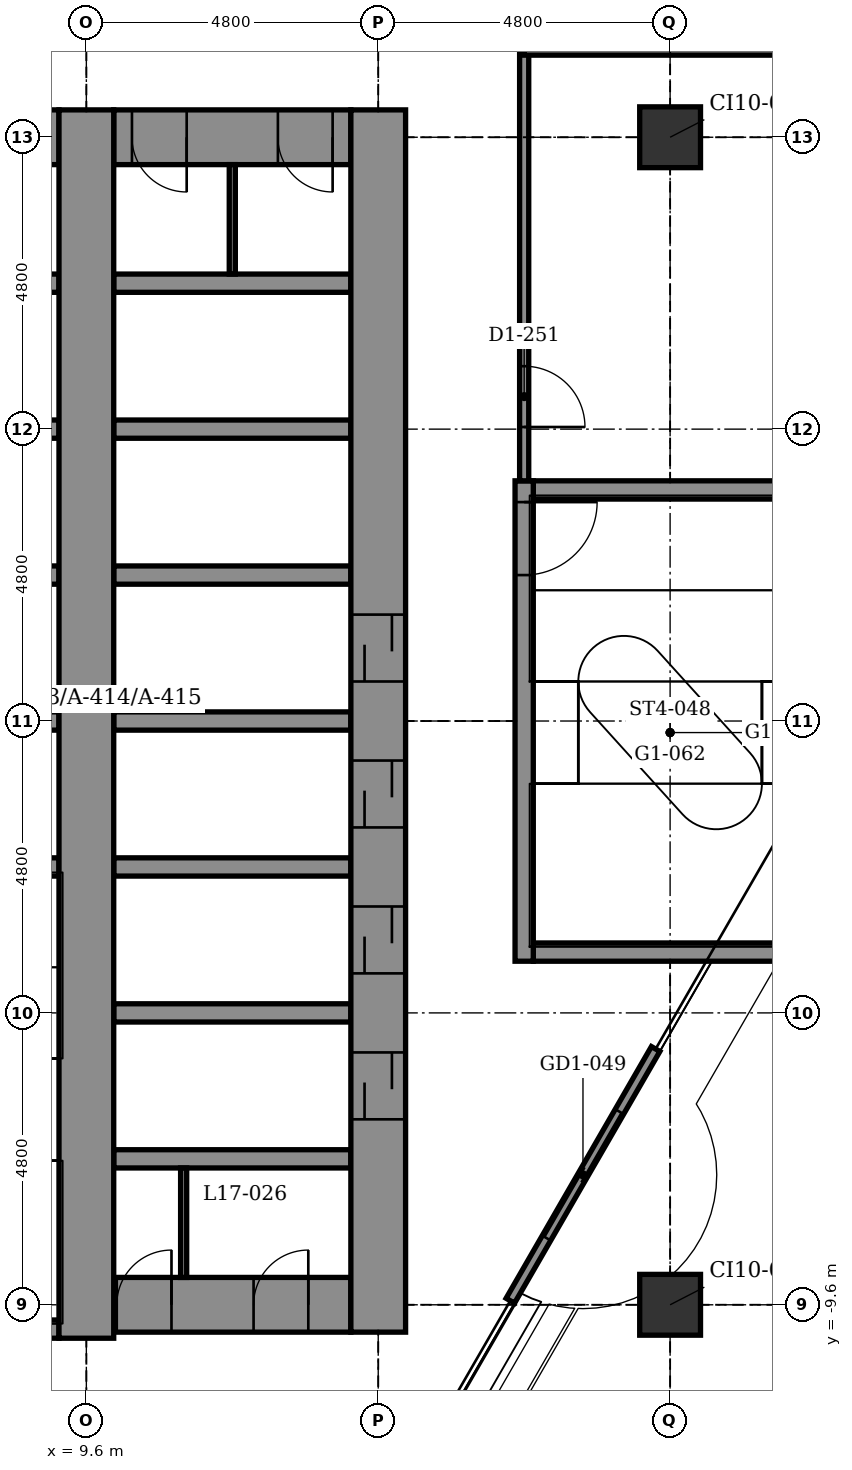
"""IFC4 building model, lengths in metres.
Left out: names, types, materials, properties, quantities, classifications, styles, units other than length and angle.
Written with IfcOpenShell. Run it as: python <this file> out.ifc"""

import sys

from ifc_helpers import new_model, si_unit, direction, frame, frame_2d, origin, origin_2d, place, context, subcontext, project, spatial, rectangle, extrude, element, fill, save


model = new_model("IFC4")
c1 = context("Model", 3, precision=1e-05, world=origin(), true_north=direction((0.0, 1.0)))
c2 = subcontext(c1, "Body", "Model", "MODEL_VIEW")
j1 = project(units=[si_unit("LENGTHUNIT", "METRE"), si_unit("PLANEANGLEUNIT", "RADIAN")], contexts=[c1])
p1 = place(None, origin())
s1 = spatial("IfcSite", under=j1, at=p1, CompositionType="ELEMENT")
p2 = place(p1, origin())
s2 = spatial("IfcBuilding", under=s1, at=p2, CompositionType="ELEMENT")
p3 = place(p2, frame((0.0, 0.0, 91.4)))
s3 = spatial("IfcBuildingStorey", under=s2, at=p3, CompositionType="ELEMENT", Elevation=91.4)
for number, where, z_axis, x_axis in (
    (1, (19.2, -9.6, -0.2), (0.0, 0.0, 1.0), (1.0, 0.0, 0.0)),
    (2, (19.2, 9.6, -0.2), (0.0, 0.0, 1.0), (1.0, 0.0, 0.0)),
):
    element("IfcColumn", number, at=place(p3, frame(where, z_axis=z_axis, x_axis=x_axis)), inside=s3, PredefinedType="COLUMN", context=c2, shape_type="SweptSolid", body=[
        extrude(rectangle(XDim=1.0, YDim=1.0, at=origin_2d()), origin(), (0.0, 0.0, 1.0), 4.5),
    ])
p4 = place(p3, frame((4.95, -10.0, -0.2), z_axis=(0.0, 0.0, 1.0), x_axis=(1.0, 0.0, 0.0)))
e3 = element("IfcWall", 3, at=p4, inside=s3, PredefinedType="STANDARD", context=c2, shape_type="SweptSolid", body=[
    extrude(rectangle(XDim=4.2, YDim=0.3, at=frame_2d((2.1, 0.0))), origin(), (0.0, 0.0, 1.0), 4.5),
])
p5 = place(p3, frame((10.05, -9.6, -0.2), z_axis=(0.0, 0.0, 1.0), x_axis=(1.0, 0.0, 0.0)))
e4 = element("IfcWall", 4, at=p5, inside=s3, PredefinedType="SHEAR", context=c2, shape_type="SweptSolid", body=[
    extrude(rectangle(XDim=3.9, YDim=0.9, at=frame_2d((1.95, 0.0))), origin(), (0.0, 0.0, 1.0), 4.5),
])
p6 = place(p5, frame((0.05, 0.0, 0.2)))
e5 = element("IfcOpeningElement", 5, at=p6, cuts=e4, PredefinedType="OPENING", context=c2, shape_type="SweptSolid", body=[
    extrude(rectangle(XDim=0.9, YDim=2.1, at=frame_2d((0.45, 1.05))), frame((0.0, 0.46, 0.0), z_axis=(0.0, -1.0, 0.0), x_axis=(1.0, 0.0, 0.0)), (0.0, 0.0, 1.0), 0.92),
])
p7 = place(p5, frame((2.3, 0.0, 0.2)))
e6 = element("IfcOpeningElement", 6, at=p7, cuts=e4, PredefinedType="OPENING", context=c2, shape_type="SweptSolid", body=[
    extrude(rectangle(XDim=0.9, YDim=2.1, at=frame_2d((0.45, 1.05))), frame((0.0, 0.46, 0.0), z_axis=(0.0, -1.0, 0.0), x_axis=(1.0, 0.0, 0.0)), (0.0, 0.0, 1.0), 0.92),
])
for number, where, z_axis, x_axis in (
    (7, (10.05, -7.2, -0.2), (0.0, 0.0, 1.0), (1.0, 0.0, 0.0)),
    (8, (10.05, -4.8, -0.2), (0.0, 0.0, 1.0), (1.0, 0.0, 0.0)),
):
    element("IfcWall", number, at=place(p3, frame(where, z_axis=z_axis, x_axis=x_axis)), inside=s3, PredefinedType="STANDARD", context=c2, shape_type="SweptSolid", body=[
        extrude(rectangle(XDim=3.9, YDim=0.3, at=frame_2d((1.95, 0.0))), origin(), (0.0, 0.0, 1.0), 4.5),
    ])
p8 = place(p3, frame((16.95, -3.8, -0.2), z_axis=(0.0, 0.0, 1.0), x_axis=(1.0, 0.0, 0.0)))
e9 = element("IfcWall", 9, at=p8, inside=s3, PredefinedType="STANDARD", context=c2, shape_type="SweptSolid", body=[
    extrude(rectangle(XDim=4.5, YDim=0.3, at=frame_2d((2.25, 0.0))), origin(), (0.0, 0.0, 1.0), 4.5),
])
p9 = place(p3, frame((6.15, -2.4, -0.2), z_axis=(0.0, 0.0, 1.0), x_axis=(1.0, 0.0, 0.0)))
e10 = element("IfcWall", 10, at=p9, inside=s3, PredefinedType="STANDARD", context=c2, shape_type="SweptSolid", body=[
    extrude(rectangle(XDim=3.0, YDim=0.3, at=frame_2d((1.5, 0.0))), origin(), (0.0, 0.0, 1.0), 4.5),
])
p10 = place(p3, frame((10.05, -2.4, -0.2), z_axis=(0.0, 0.0, 1.0), x_axis=(1.0, 0.0, 0.0)))
e11 = element("IfcWall", 11, at=p10, inside=s3, PredefinedType="STANDARD", context=c2, shape_type="SweptSolid", body=[
    extrude(rectangle(XDim=3.9, YDim=0.3, at=frame_2d((1.95, 0.0))), origin(), (0.0, 0.0, 1.0), 4.5),
])
p11 = place(p3, frame((6.15, 0.0, -0.2), z_axis=(0.0, 0.0, 1.0), x_axis=(1.0, 0.0, 0.0)))
e12 = element("IfcWall", 12, at=p11, inside=s3, PredefinedType="STANDARD", context=c2, shape_type="SweptSolid", body=[
    extrude(rectangle(XDim=3.0, YDim=0.3, at=frame_2d((1.5, 0.0))), origin(), (0.0, 0.0, 1.0), 4.5),
])
p12 = place(p3, frame((10.05, 0.0, -0.2), z_axis=(0.0, 0.0, 1.0), x_axis=(1.0, 0.0, 0.0)))
e13 = element("IfcWall", 13, at=p12, inside=s3, PredefinedType="STANDARD", context=c2, shape_type="SweptSolid", body=[
    extrude(rectangle(XDim=3.9, YDim=0.3, at=frame_2d((1.95, 0.0))), origin(), (0.0, 0.0, 1.0), 4.5),
])
p13 = place(p3, frame((6.15, 2.4, -0.2), z_axis=(0.0, 0.0, 1.0), x_axis=(1.0, 0.0, 0.0)))
e14 = element("IfcWall", 14, at=p13, inside=s3, PredefinedType="STANDARD", context=c2, shape_type="SweptSolid", body=[
    extrude(rectangle(XDim=3.0, YDim=0.3, at=frame_2d((1.5, 0.0))), origin(), (0.0, 0.0, 1.0), 4.5),
])
p14 = place(p3, frame((10.05, 2.4, -0.2), z_axis=(0.0, 0.0, 1.0), x_axis=(1.0, 0.0, 0.0)))
e15 = element("IfcWall", 15, at=p14, inside=s3, PredefinedType="STANDARD", context=c2, shape_type="SweptSolid", body=[
    extrude(rectangle(XDim=3.9, YDim=0.3, at=frame_2d((1.95, 0.0))), origin(), (0.0, 0.0, 1.0), 4.5),
])
p15 = place(p3, frame((16.95, 3.8, -0.2), z_axis=(0.0, 0.0, 1.0), x_axis=(1.0, 0.0, 0.0)))
e16 = element("IfcWall", 16, at=p15, inside=s3, PredefinedType="STANDARD", context=c2, shape_type="SweptSolid", body=[
    extrude(rectangle(XDim=4.5, YDim=0.3, at=frame_2d((2.25, 0.0))), origin(), (0.0, 0.0, 1.0), 4.5),
])
p16 = place(p3, frame((6.15, 4.8, -0.2), z_axis=(0.0, 0.0, 1.0), x_axis=(1.0, 0.0, 0.0)))
e17 = element("IfcWall", 17, at=p16, inside=s3, PredefinedType="STANDARD", context=c2, shape_type="SweptSolid", body=[
    extrude(rectangle(XDim=3.0, YDim=0.3, at=frame_2d((1.5, 0.0))), origin(), (0.0, 0.0, 1.0), 4.5),
])
p17 = place(p3, frame((10.05, 4.8, -0.2), z_axis=(0.0, 0.0, 1.0), x_axis=(1.0, 0.0, 0.0)))
e18 = element("IfcWall", 18, at=p17, inside=s3, PredefinedType="STANDARD", context=c2, shape_type="SweptSolid", body=[
    extrude(rectangle(XDim=3.9, YDim=0.3, at=frame_2d((1.95, 0.0))), origin(), (0.0, 0.0, 1.0), 4.5),
])
p18 = place(p3, frame((6.0, 7.2, -0.2), z_axis=(0.0, 0.0, 1.0), x_axis=(1.0, 0.0, 0.0)))
e19 = element("IfcWall", 19, at=p18, inside=s3, PredefinedType="STANDARD", context=c2, shape_type="SweptSolid", body=[
    extrude(rectangle(XDim=3.15, YDim=0.3, at=frame_2d((1.575, 0.0))), origin(), (0.0, 0.0, 1.0), 4.5),
])
p19 = place(p3, frame((10.05, 7.2, -0.2), z_axis=(0.0, 0.0, 1.0), x_axis=(1.0, 0.0, 0.0)))
e20 = element("IfcWall", 20, at=p19, inside=s3, PredefinedType="STANDARD", context=c2, shape_type="SweptSolid", body=[
    extrude(rectangle(XDim=3.9, YDim=0.3, at=frame_2d((1.95, 0.0))), origin(), (0.0, 0.0, 1.0), 4.5),
])
p20 = place(p3, frame((-5.25, 9.6, -0.2), z_axis=(0.0, 0.0, 1.0), x_axis=(1.0, 0.0, 0.0)))
e21 = element("IfcWall", 21, at=p20, inside=s3, PredefinedType="SHEAR", context=c2, shape_type="SweptSolid", body=[
    extrude(rectangle(XDim=14.4, YDim=0.9, at=frame_2d((7.2, 0.0))), origin(), (0.0, 0.0, 1.0), 4.5),
])
p21 = place(p20, frame((9.35, 0.0, 0.2)))
e22 = element("IfcOpeningElement", 22, at=p21, cuts=e21, PredefinedType="OPENING", context=c2, shape_type="SweptSolid", body=[
    extrude(rectangle(XDim=1.4, YDim=2.1, at=frame_2d((0.7, 1.05))), frame((0.0, 0.46, 0.0), z_axis=(0.0, -1.0, 0.0), x_axis=(1.0, 0.0, 0.0)), (0.0, 0.0, 1.0), 0.92),
])
p22 = place(p3, frame((10.05, 9.6, -0.2), z_axis=(0.0, 0.0, 1.0), x_axis=(1.0, 0.0, 0.0)))
e23 = element("IfcWall", 23, at=p22, inside=s3, PredefinedType="SHEAR", context=c2, shape_type="SweptSolid", body=[
    extrude(rectangle(XDim=3.9, YDim=0.9, at=frame_2d((1.95, 0.0))), origin(), (0.0, 0.0, 1.0), 4.5),
])
p23 = place(p22, frame((0.3, 0.0, 0.2)))
e24 = element("IfcOpeningElement", 24, at=p23, cuts=e23, PredefinedType="OPENING", context=c2, shape_type="SweptSolid", body=[
    extrude(rectangle(XDim=0.9, YDim=2.1, at=frame_2d((0.45, 1.05))), frame((0.0, 0.46, 0.0), z_axis=(0.0, -1.0, 0.0), x_axis=(1.0, 0.0, 0.0)), (0.0, 0.0, 1.0), 0.92),
])
p24 = place(p22, frame((2.7, 0.0, 0.2)))
e25 = element("IfcOpeningElement", 25, at=p24, cuts=e23, PredefinedType="OPENING", context=c2, shape_type="SweptSolid", body=[
    extrude(rectangle(XDim=0.9, YDim=2.1, at=frame_2d((0.45, 1.05))), frame((0.0, 0.46, 0.0), z_axis=(0.0, -1.0, 0.0), x_axis=(1.0, 0.0, 0.0)), (0.0, 0.0, 1.0), 0.92),
])
p25 = place(p3, frame((9.6, -10.15, -0.2), z_axis=(0.0, 0.0, 1.0), x_axis=(0.0, 1.0, 0.0)))
e26 = element("IfcWall", 26, at=p25, inside=s3, PredefinedType="SHEAR", context=c2, shape_type="SweptSolid", body=[
    extrude(rectangle(XDim=20.2, YDim=0.9, at=frame_2d((10.1, 0.0))), origin(), (0.0, 0.0, 1.0), 4.5),
])
p26 = place(p3, frame((14.4, -10.05, -0.2), z_axis=(0.0, 0.0, 1.0), x_axis=(0.0, 1.0, 0.0)))
e27 = element("IfcWall", 27, at=p26, inside=s3, PredefinedType="SHEAR", context=c2, shape_type="SweptSolid", body=[
    extrude(rectangle(XDim=20.1, YDim=0.9, at=frame_2d((10.05, 0.0))), origin(), (0.0, 0.0, 1.0), 4.5),
])
p27 = place(p26, frame((3.5, 0.0, 0.2)))
e28 = element("IfcOpeningElement", 28, at=p27, cuts=e27, PredefinedType="OPENING", context=c2, shape_type="SweptSolid", body=[
    extrude(rectangle(XDim=1.1, YDim=2.1, at=frame_2d((0.55, 1.05))), frame((0.0, 0.46, 0.0), z_axis=(0.0, -1.0, 0.0), x_axis=(1.0, 0.0, 0.0)), (0.0, 0.0, 1.0), 0.92),
])
p28 = place(p26, frame((5.9, 0.0, 0.2)))
e29 = element("IfcOpeningElement", 29, at=p28, cuts=e27, PredefinedType="OPENING", context=c2, shape_type="SweptSolid", body=[
    extrude(rectangle(XDim=1.1, YDim=2.1, at=frame_2d((0.55, 1.05))), frame((0.0, 0.46, 0.0), z_axis=(0.0, -1.0, 0.0), x_axis=(1.0, 0.0, 0.0)), (0.0, 0.0, 1.0), 0.92),
])
p29 = place(p26, frame((8.3, 0.0, 0.2)))
e30 = element("IfcOpeningElement", 30, at=p29, cuts=e27, PredefinedType="OPENING", context=c2, shape_type="SweptSolid", body=[
    extrude(rectangle(XDim=1.1, YDim=2.1, at=frame_2d((0.55, 1.05))), frame((0.0, 0.46, 0.0), z_axis=(0.0, -1.0, 0.0), x_axis=(1.0, 0.0, 0.0)), (0.0, 0.0, 1.0), 0.92),
])
p30 = place(p26, frame((10.7, 0.0, 0.2)))
e31 = element("IfcOpeningElement", 31, at=p30, cuts=e27, PredefinedType="OPENING", context=c2, shape_type="SweptSolid", body=[
    extrude(rectangle(XDim=1.1, YDim=2.1, at=frame_2d((0.55, 1.05))), frame((0.0, 0.46, 0.0), z_axis=(0.0, -1.0, 0.0), x_axis=(1.0, 0.0, 0.0)), (0.0, 0.0, 1.0), 0.92),
])
p31 = place(p3, frame((16.8, -3.95, -0.2), z_axis=(0.0, 0.0, 1.0), x_axis=(0.0, 1.0, 0.0)))
e32 = element("IfcWall", 32, at=p31, inside=s3, PredefinedType="STANDARD", context=c2, shape_type="SweptSolid", body=[
    extrude(rectangle(XDim=7.9, YDim=0.3, at=frame_2d((3.95, 0.0))), origin(), (0.0, 0.0, 1.0), 4.5),
])
p32 = place(p31, frame((6.35, 0.0, 0.2)))
e33 = element("IfcOpeningElement", 33, at=p32, cuts=e32, PredefinedType="OPENING", context=c2, shape_type="SweptSolid", body=[
    extrude(rectangle(XDim=1.2, YDim=2.1, at=frame_2d((0.6, 1.05))), frame((0.0, 0.16, 0.0), z_axis=(0.0, -1.0, 0.0), x_axis=(1.0, 0.0, 0.0)), (0.0, 0.0, 1.0), 0.32),
])
p33 = place(p3, frame((18.962, -5.394, 0.0), z_axis=(0.0, 0.0, 1.0), x_axis=(-0.500017192868, -0.86601547725, 0.0)))
e34 = element("IfcWall", 34, at=p33, inside=s3, PredefinedType="PARTITIONING", context=c2, shape_type="SweptSolid", body=[
    extrude(rectangle(XDim=4.78, YDim=0.16, at=frame_2d((2.39, 0.0))), origin(), (0.0, 0.0, 1.0), 4.3),
])
p34 = place(p33, frame((1.19, 0.0, 0.0)))
e35 = element("IfcOpeningElement", 35, at=p34, cuts=e34, PredefinedType="OPENING", context=c2, shape_type="SweptSolid", body=[
    extrude(rectangle(XDim=2.4, YDim=2.4, at=frame_2d((1.2, 1.2))), frame((0.0, 0.09, 0.0), z_axis=(0.0, -1.0, 0.0), x_axis=(1.0, 0.0, 0.0)), (0.0, 0.0, 1.0), 0.18),
])
p35 = place(p3, frame((16.8, 3.95, 0.0), z_axis=(0.0, 0.0, 1.0), x_axis=(0.0, 1.0, 0.0)))
e36 = element("IfcWall", 36, at=p35, inside=s3, PredefinedType="PARTITIONING", context=c2, shape_type="SweptSolid", body=[
    extrude(rectangle(XDim=8.75, YDim=0.15, at=frame_2d((4.375, 0.0))), origin(), (0.0, 0.0, 1.0), 4.3),
])
p36 = place(p35, frame((7.425, 0.0, 0.0)))
e37 = element("IfcOpeningElement", 37, at=p36, cuts=e36, PredefinedType="OPENING", context=c2, shape_type="SweptSolid", body=[
    extrude(rectangle(XDim=1.0, YDim=2.1, at=frame_2d((0.5, 1.05))), frame((0.0, 0.085, 0.0), z_axis=(0.0, -1.0, 0.0), x_axis=(1.0, 0.0, 0.0)), (0.0, 0.0, 1.0), 0.17),
])
p37 = place(p35, frame((0.885, 0.0, 0.0)))
e38 = element("IfcOpeningElement", 38, at=p37, cuts=e36, PredefinedType="OPENING", context=c2, shape_type="SweptSolid", body=[
    extrude(rectangle(XDim=1.0, YDim=2.1, at=frame_2d((0.5, 1.05))), frame((0.0, 0.085, 0.0), z_axis=(0.0, -1.0, 0.0), x_axis=(1.0, 0.0, 0.0)), (0.0, 0.0, 1.0), 0.17),
])
for number, where, z_axis, x_axis in (
    (39, (12.0, 7.35, 0.0), (0.0, 0.0, 1.0), (0.0, 1.0, 0.0)),
    (40, (11.2, -9.15, 0.0), (0.0, 0.0, 1.0), (0.0, 1.0, 0.0)),
):
    element("IfcWall", number, at=place(p3, frame(where, z_axis=z_axis, x_axis=x_axis)), inside=s3, PredefinedType="PARTITIONING", context=c2, shape_type="SweptSolid", body=[
        extrude(rectangle(XDim=1.8, YDim=0.1, at=frame_2d((0.9, 0.0))), origin(), (0.0, 0.0, 1.0), 4.3),
    ])
p38 = place(p3, frame((16.8, 11.0, 0.0), z_axis=(0.0, 0.0, 1.0), x_axis=(1.0, 0.0, 0.0)))
e41 = element("IfcWall", 41, at=p38, inside=s3, PredefinedType="PARTITIONING", context=c2, shape_type="SweptSolid", body=[
    extrude(rectangle(XDim=8.578, YDim=0.1, at=frame_2d((4.289, 0.0))), origin(), (0.0, 0.0, 1.0), 4.3),
])
p39 = place(p34, origin())
e42 = element("IfcDoor", 42, at=p39, inside=s3, OperationType="DOUBLE_DOOR_SLIDING", PredefinedType="DOOR", context=c2, shape_type="SweptSolid", body=[
    extrude(rectangle(XDim=2.4, YDim=2.4, at=frame_2d((1.2, 1.2))), frame((0.0, 0.025, 0.0), z_axis=(0.0, -1.0, 0.0), x_axis=(1.0, 0.0, 0.0)), (0.0, 0.0, 1.0), 0.05),
])
fill(e35, e42)
p40 = place(p37, frame((1.0, 0.0, 0.0), z_axis=(0.0, 0.0, 1.0), x_axis=(-1.0, 0.0, 0.0)))
e43 = element("IfcDoor", 43, at=p40, inside=s3, OperationType="SINGLE_SWING_LEFT", PredefinedType="DOOR", context=c2, shape_type="SweptSolid", body=[
    extrude(rectangle(XDim=1.0, YDim=2.1, at=frame_2d((0.5, 1.05))), frame((0.0, 0.025, 0.0), z_axis=(0.0, -1.0, 0.0), x_axis=(1.0, 0.0, 0.0)), (0.0, 0.0, 1.0), 0.05),
])
fill(e38, e43)
p41 = place(p27, origin())
e44 = element("IfcDoor", 44, at=p41, inside=s3, OperationType="DOUBLE_DOOR_SLIDING", PredefinedType="DOOR", context=c2, shape_type="SweptSolid", body=[
    extrude(rectangle(XDim=1.1, YDim=2.1, at=frame_2d((0.55, 1.05))), frame((0.0, 0.025, 0.0), z_axis=(0.0, -1.0, 0.0), x_axis=(1.0, 0.0, 0.0)), (0.0, 0.0, 1.0), 0.05),
])
fill(e28, e44)
p42 = place(p28, origin())
e45 = element("IfcDoor", 45, at=p42, inside=s3, OperationType="DOUBLE_DOOR_SLIDING", PredefinedType="DOOR", context=c2, shape_type="SweptSolid", body=[
    extrude(rectangle(XDim=1.1, YDim=2.1, at=frame_2d((0.55, 1.05))), frame((0.0, 0.025, 0.0), z_axis=(0.0, -1.0, 0.0), x_axis=(1.0, 0.0, 0.0)), (0.0, 0.0, 1.0), 0.05),
])
fill(e29, e45)
p43 = place(p29, origin())
e46 = element("IfcDoor", 46, at=p43, inside=s3, OperationType="DOUBLE_DOOR_SLIDING", PredefinedType="DOOR", context=c2, shape_type="SweptSolid", body=[
    extrude(rectangle(XDim=1.1, YDim=2.1, at=frame_2d((0.55, 1.05))), frame((0.0, 0.025, 0.0), z_axis=(0.0, -1.0, 0.0), x_axis=(1.0, 0.0, 0.0)), (0.0, 0.0, 1.0), 0.05),
])
fill(e30, e46)
p44 = place(p30, origin())
e47 = element("IfcDoor", 47, at=p44, inside=s3, OperationType="DOUBLE_DOOR_SLIDING", PredefinedType="DOOR", context=c2, shape_type="SweptSolid", body=[
    extrude(rectangle(XDim=1.1, YDim=2.1, at=frame_2d((0.55, 1.05))), frame((0.0, 0.025, 0.0), z_axis=(0.0, -1.0, 0.0), x_axis=(1.0, 0.0, 0.0)), (0.0, 0.0, 1.0), 0.05),
])
fill(e31, e47)
p45 = place(p32, frame((1.2, 0.0, 0.0), z_axis=(0.0, 0.0, 1.0), x_axis=(-1.0, 0.0, 0.0)))
e48 = element("IfcDoor", 48, at=p45, inside=s3, OperationType="SINGLE_SWING_RIGHT", PredefinedType="DOOR", context=c2, shape_type="SweptSolid", body=[
    extrude(rectangle(XDim=1.2, YDim=2.1, at=frame_2d((0.6, 1.05))), frame((0.0, 0.025, 0.0), z_axis=(0.0, -1.0, 0.0), x_axis=(1.0, 0.0, 0.0)), (0.0, 0.0, 1.0), 0.05),
])
fill(e33, e48)
p46 = place(p6, origin())
e49 = element("IfcDoor", 49, at=p46, inside=s3, OperationType="SINGLE_SWING_RIGHT", PredefinedType="DOOR", context=c2, shape_type="SweptSolid", body=[
    extrude(rectangle(XDim=0.9, YDim=2.1, at=frame_2d((0.45, 1.05))), frame((0.0, 0.025, 0.0), z_axis=(0.0, -1.0, 0.0), x_axis=(1.0, 0.0, 0.0)), (0.0, 0.0, 1.0), 0.05),
])
fill(e5, e49)
p47 = place(p7, origin())
e50 = element("IfcDoor", 50, at=p47, inside=s3, OperationType="SINGLE_SWING_RIGHT", PredefinedType="DOOR", context=c2, shape_type="SweptSolid", body=[
    extrude(rectangle(XDim=0.9, YDim=2.1, at=frame_2d((0.45, 1.05))), frame((0.0, 0.025, 0.0), z_axis=(0.0, -1.0, 0.0), x_axis=(1.0, 0.0, 0.0)), (0.0, 0.0, 1.0), 0.05),
])
fill(e6, e50)
p48 = place(p23, frame((0.9, 0.0, 0.0), z_axis=(0.0, 0.0, 1.0), x_axis=(-1.0, 0.0, 0.0)))
e51 = element("IfcDoor", 51, at=p48, inside=s3, OperationType="SINGLE_SWING_RIGHT", PredefinedType="DOOR", context=c2, shape_type="SweptSolid", body=[
    extrude(rectangle(XDim=0.9, YDim=2.1, at=frame_2d((0.45, 1.05))), frame((0.0, 0.025, 0.0), z_axis=(0.0, -1.0, 0.0), x_axis=(1.0, 0.0, 0.0)), (0.0, 0.0, 1.0), 0.05),
])
fill(e24, e51)
p49 = place(p24, frame((0.9, 0.0, 0.0), z_axis=(0.0, 0.0, 1.0), x_axis=(-1.0, 0.0, 0.0)))
e52 = element("IfcDoor", 52, at=p49, inside=s3, OperationType="SINGLE_SWING_RIGHT", PredefinedType="DOOR", context=c2, shape_type="SweptSolid", body=[
    extrude(rectangle(XDim=0.9, YDim=2.1, at=frame_2d((0.45, 1.05))), frame((0.0, 0.025, 0.0), z_axis=(0.0, -1.0, 0.0), x_axis=(1.0, 0.0, 0.0)), (0.0, 0.0, 1.0), 0.05),
])
fill(e25, e52)
save(model, sys.argv[1])
